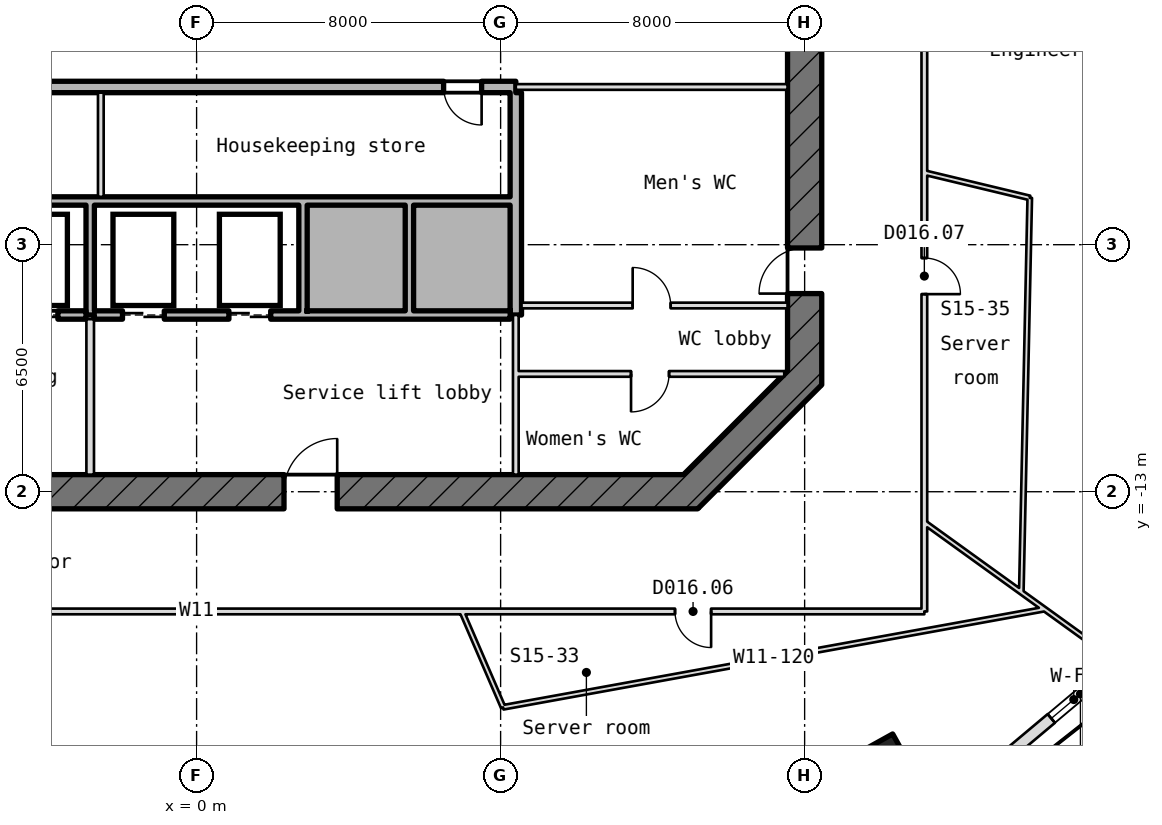
"""IFC4 building model, lengths in metres.
Left out: names, types, materials, properties, quantities, classifications, styles, units other than length and angle.
Written with IfcOpenShell. Run it as: python <this file> out.ifc"""

import sys

from ifc_helpers import new_model, si_unit, direction, frame, frame_2d, origin, origin_2d, place, context, subcontext, project, spatial, rectangle, hollow_rectangle, extrude, element, fill, save


model = new_model("IFC4")
c1 = context("Model", 3, precision=1e-05, world=origin(), true_north=direction((0.0, 1.0)))
c2 = subcontext(c1, "Body", "Model", "MODEL_VIEW")
j1 = project(units=[si_unit("LENGTHUNIT", "METRE"), si_unit("PLANEANGLEUNIT", "RADIAN")], contexts=[c1])
p1 = place(None, origin())
s1 = spatial("IfcSite", under=j1, at=p1, CompositionType="ELEMENT")
p2 = place(p1, origin())
s2 = spatial("IfcBuilding", under=s1, at=p2, CompositionType="ELEMENT")
p3 = place(p2, frame((0.0, 0.0, 223.3)))
s3 = spatial("IfcBuildingStorey", under=s2, at=p3, CompositionType="ELEMENT", Elevation=223.3)
p4 = place(p3, frame((17.971, -20.709, -0.18), z_axis=(0.0, 0.0, 1.0), x_axis=(-0.87430051837, -0.485385005514, 0.0)))
e1 = element("IfcColumn", 1, at=p4, inside=s3, PredefinedType="COLUMN", context=c2, shape_type="SweptSolid", body=[
    extrude(hollow_rectangle(XDim=1.9, YDim=2.0, WallThickness=0.07, at=origin_2d()), origin(), (0.0, 0.0, 1.0), 4.15),
])
p5 = place(p3, frame((18.849, -22.023, 0.0), z_axis=(0.0, 0.0, 1.0), x_axis=(0.765870158107, 0.642995257308, 0.0)))
e2 = element("IfcWall", 2, at=p5, inside=s3, PredefinedType="SOLIDWALL", context=c2, shape_type="SweptSolid", body=[
    extrude(rectangle(XDim=11.055, YDim=0.3, at=frame_2d((5.528, 0.0))), origin(), (0.0, 0.0, 1.0), 3.97),
])
p6 = place(p5, frame((7.355, 0.0, 0.0)))
e3 = element("IfcOpeningElement", 3, at=p6, cuts=e2, PredefinedType="OPENING", context=c2, shape_type="SweptSolid", body=[
    extrude(rectangle(XDim=1.8, YDim=2.4, at=frame_2d((0.9, 1.2))), frame((0.0, 0.16, 0.0), z_axis=(0.0, -1.0, 0.0), x_axis=(1.0, 0.0, 0.0)), (0.0, 0.0, 1.0), 0.32),
])
p7 = place(p5, frame((4.755, 0.0, 0.9)))
e4 = element("IfcOpeningElement", 4, at=p7, cuts=e2, PredefinedType="OPENING", context=c2, shape_type="SweptSolid", body=[
    extrude(rectangle(XDim=2.0, YDim=1.5, at=frame_2d((1.0, 0.75))), frame((0.0, 0.16, 0.0), z_axis=(0.0, -1.0, 0.0), x_axis=(1.0, 0.0, 0.0)), (0.0, 0.0, 1.0), 0.32),
])
p8 = place(p3, frame((12.868, -13.132, -0.18), z_axis=(0.0, 0.0, 1.0), x_axis=(0.707106781187, 0.707106781187, 0.0)))
e5 = element("IfcWall", 5, at=p8, inside=s3, PredefinedType="SHEAR", context=c2, shape_type="SweptSolid", body=[
    extrude(rectangle(XDim=4.615, YDim=0.9, at=frame_2d((2.308, 0.0))), origin(), (0.0, 0.0, 1.0), 4.15),
])
p9 = place(p3, frame((16.0, -10.186, -0.18), z_axis=(0.0, 0.0, 1.0), x_axis=(0.0, 1.0, 0.0)))
e6 = element("IfcWall", 6, at=p9, inside=s3, PredefinedType="SHEAR", context=c2, shape_type="SweptSolid", body=[
    extrude(rectangle(XDim=20.373, YDim=0.9, at=frame_2d((10.186, 0.0))), origin(), (0.0, 0.0, 1.0), 4.15),
])
p10 = place(p9, frame((8.986, 0.0, 0.18)))
e7 = element("IfcOpeningElement", 7, at=p10, cuts=e6, PredefinedType="OPENING", context=c2, shape_type="SweptSolid", body=[
    extrude(rectangle(XDim=2.4, YDim=2.1, at=frame_2d((1.2, 1.05))), frame((0.0, 0.46, 0.0), z_axis=(0.0, -1.0, 0.0), x_axis=(1.0, 0.0, 0.0)), (0.0, 0.0, 1.0), 0.92),
])
p11 = place(p9, frame((13.586, 0.0, 0.18)))
e8 = element("IfcOpeningElement", 8, at=p11, cuts=e6, PredefinedType="OPENING", context=c2, shape_type="SweptSolid", body=[
    extrude(rectangle(XDim=1.2, YDim=2.1, at=frame_2d((0.6, 1.05))), frame((0.0, 0.46, 0.0), z_axis=(0.0, -1.0, 0.0), x_axis=(1.0, 0.0, 0.0)), (0.0, 0.0, 1.0), 0.92),
])
p12 = place(p9, frame((2.4, 0.0, 0.18)))
e9 = element("IfcOpeningElement", 9, at=p12, cuts=e6, PredefinedType="OPENING", context=c2, shape_type="SweptSolid", body=[
    extrude(rectangle(XDim=1.2, YDim=2.1, at=frame_2d((0.6, 1.05))), frame((0.0, 0.46, 0.0), z_axis=(0.0, -1.0, 0.0), x_axis=(1.0, 0.0, 0.0)), (0.0, 0.0, 1.0), 0.92),
])
p13 = place(p3, frame((-13.186, -13.0, -0.18), z_axis=(0.0, 0.0, 1.0), x_axis=(1.0, 0.0, 0.0)))
e10 = element("IfcWall", 10, at=p13, inside=s3, PredefinedType="SHEAR", context=c2, shape_type="SweptSolid", body=[
    extrude(rectangle(XDim=26.373, YDim=0.9, at=frame_2d((13.186, 0.0))), origin(), (0.0, 0.0, 1.0), 4.15),
])
p14 = place(p13, frame((2.886, 0.0, 0.18)))
e11 = element("IfcOpeningElement", 11, at=p14, cuts=e10, PredefinedType="OPENING", context=c2, shape_type="SweptSolid", body=[
    extrude(rectangle(XDim=1.2, YDim=2.1, at=frame_2d((0.6, 1.05))), frame((0.0, 0.46, 0.0), z_axis=(0.0, -1.0, 0.0), x_axis=(1.0, 0.0, 0.0)), (0.0, 0.0, 1.0), 0.92),
])
p15 = place(p13, frame((6.886, 0.0, 0.18)))
e12 = element("IfcOpeningElement", 12, at=p15, cuts=e10, PredefinedType="OPENING", context=c2, shape_type="SweptSolid", body=[
    extrude(rectangle(XDim=1.4, YDim=2.1, at=frame_2d((0.7, 1.05))), frame((0.0, 0.46, 0.0), z_axis=(0.0, -1.0, 0.0), x_axis=(1.0, 0.0, 0.0)), (0.0, 0.0, 1.0), 0.92),
])
p16 = place(p13, frame((15.486, 0.0, 0.18)))
e13 = element("IfcOpeningElement", 13, at=p16, cuts=e10, PredefinedType="OPENING", context=c2, shape_type="SweptSolid", body=[
    extrude(rectangle(XDim=1.4, YDim=2.1, at=frame_2d((0.7, 1.05))), frame((0.0, 0.46, 0.0), z_axis=(0.0, -1.0, 0.0), x_axis=(1.0, 0.0, 0.0)), (0.0, 0.0, 1.0), 0.92),
])
p17 = place(p3, frame((8.475, -9.9, 0.0), z_axis=(0.0, 0.0, 1.0), x_axis=(1.0, 0.0, 0.0)))
e14 = element("IfcWall", 14, at=p17, inside=s3, PredefinedType="PARTITIONING", context=c2, shape_type="SweptSolid", body=[
    extrude(rectangle(XDim=6.989, YDim=0.15, at=frame_2d((3.494, 0.0))), origin(), (0.0, 0.0, 1.0), 3.97),
])
p18 = place(p17, frame((2.957, 0.0, 0.0)))
e15 = element("IfcOpeningElement", 15, at=p18, cuts=e14, PredefinedType="OPENING", context=c2, shape_type="SweptSolid", body=[
    extrude(rectangle(XDim=1.0, YDim=2.1, at=frame_2d((0.5, 1.05))), frame((0.0, 0.085, 0.0), z_axis=(0.0, -1.0, 0.0), x_axis=(1.0, 0.0, 0.0)), (0.0, 0.0, 1.0), 0.17),
])
p19 = place(p3, frame((-8.25, -8.35, 0.0), z_axis=(0.0, 0.0, 1.0), x_axis=(1.0, 0.0, 0.0)))
e16 = element("IfcWall", 16, at=p19, inside=s3, PredefinedType="STANDARD", context=c2, shape_type="SweptSolid", body=[
    extrude(rectangle(XDim=5.34, YDim=0.22, at=frame_2d((2.67, 0.0))), origin(), (0.0, 0.0, 1.0), 3.97),
])
p20 = place(p19, frame((0.7, 0.0, 0.0)))
e17 = element("IfcOpeningElement", 17, at=p20, cuts=e16, PredefinedType="OPENING", context=c2, shape_type="SweptSolid", body=[
    extrude(rectangle(XDim=1.1, YDim=2.1, at=frame_2d((0.55, 1.05))), frame((0.0, 0.12, 0.0), z_axis=(0.0, -1.0, 0.0), x_axis=(1.0, 0.0, 0.0)), (0.0, 0.0, 1.0), 0.24),
])
p21 = place(p19, frame((3.5, 0.0, 0.0)))
e18 = element("IfcOpeningElement", 18, at=p21, cuts=e16, PredefinedType="OPENING", context=c2, shape_type="SweptSolid", body=[
    extrude(rectangle(XDim=1.1, YDim=2.1, at=frame_2d((0.55, 1.05))), frame((0.0, 0.12, 0.0), z_axis=(0.0, -1.0, 0.0), x_axis=(1.0, 0.0, 0.0)), (0.0, 0.0, 1.0), 0.24),
])
p22 = place(p3, frame((-2.69, -8.35, 0.0), z_axis=(0.0, 0.0, 1.0), x_axis=(1.0, 0.0, 0.0)))
e19 = element("IfcWall", 19, at=p22, inside=s3, PredefinedType="STANDARD", context=c2, shape_type="SweptSolid", body=[
    extrude(rectangle(XDim=10.94, YDim=0.22, at=frame_2d((5.47, 0.0))), origin(), (0.0, 0.0, 1.0), 3.97),
])
p23 = place(p22, frame((0.74, 0.0, 0.0)))
e20 = element("IfcOpeningElement", 20, at=p23, cuts=e19, PredefinedType="OPENING", context=c2, shape_type="SweptSolid", body=[
    extrude(rectangle(XDim=1.1, YDim=2.1, at=frame_2d((0.55, 1.05))), frame((0.0, 0.12, 0.0), z_axis=(0.0, -1.0, 0.0), x_axis=(1.0, 0.0, 0.0)), (0.0, 0.0, 1.0), 0.24),
])
p24 = place(p22, frame((3.54, 0.0, 0.0)))
e21 = element("IfcOpeningElement", 21, at=p24, cuts=e19, PredefinedType="OPENING", context=c2, shape_type="SweptSolid", body=[
    extrude(rectangle(XDim=1.1, YDim=2.1, at=frame_2d((0.55, 1.05))), frame((0.0, 0.12, 0.0), z_axis=(0.0, -1.0, 0.0), x_axis=(1.0, 0.0, 0.0)), (0.0, 0.0, 1.0), 0.24),
])
p25 = place(p3, frame((8.55, -8.1, 0.0), z_axis=(0.0, 0.0, 1.0), x_axis=(1.0, 0.0, 0.0)))
e22 = element("IfcWall", 22, at=p25, inside=s3, PredefinedType="PARTITIONING", context=c2, shape_type="SweptSolid", body=[
    extrude(rectangle(XDim=7.0, YDim=0.15, at=frame_2d((3.5, 0.0))), origin(), (0.0, 0.0, 1.0), 3.97),
])
p26 = place(p25, frame((2.925, 0.0, 0.0)))
e23 = element("IfcOpeningElement", 23, at=p26, cuts=e22, PredefinedType="OPENING", context=c2, shape_type="SweptSolid", body=[
    extrude(rectangle(XDim=1.0, YDim=2.1, at=frame_2d((0.5, 1.05))), frame((0.0, 0.085, 0.0), z_axis=(0.0, -1.0, 0.0), x_axis=(1.0, 0.0, 0.0)), (0.0, 0.0, 1.0), 0.17),
])
p27 = place(p3, frame((-8.25, -5.35, 0.0), z_axis=(0.0, 0.0, 1.0), x_axis=(1.0, 0.0, 0.0)))
e24 = element("IfcWall", 24, at=p27, inside=s3, PredefinedType="STANDARD", context=c2, shape_type="SweptSolid", body=[
    extrude(rectangle(XDim=16.5, YDim=0.22, at=frame_2d((8.25, 0.0))), origin(), (0.0, 0.0, 1.0), 3.97),
])
p28 = place(p3, frame((-8.4, -2.35, -0.18), z_axis=(0.0, 0.0, 1.0), x_axis=(1.0, 0.0, 0.0)))
e25 = element("IfcWall", 25, at=p28, inside=s3, PredefinedType="SHEAR", context=c2, shape_type="SweptSolid", body=[
    extrude(rectangle(XDim=16.8, YDim=0.3, at=frame_2d((8.4, 0.0))), origin(), (0.0, 0.0, 1.0), 4.15),
])
p29 = place(p28, frame((0.9, 0.0, 0.18)))
e26 = element("IfcOpeningElement", 26, at=p29, cuts=e25, PredefinedType="OPENING", context=c2, shape_type="SweptSolid", body=[
    extrude(rectangle(XDim=1.0, YDim=2.1, at=frame_2d((0.5, 1.05))), frame((0.0, 0.16, 0.0), z_axis=(0.0, -1.0, 0.0), x_axis=(1.0, 0.0, 0.0)), (0.0, 0.0, 1.0), 0.32),
])
p30 = place(p28, frame((14.9, 0.0, 0.18)))
e27 = element("IfcOpeningElement", 27, at=p30, cuts=e25, PredefinedType="OPENING", context=c2, shape_type="SweptSolid", body=[
    extrude(rectangle(XDim=1.0, YDim=2.1, at=frame_2d((0.5, 1.05))), frame((0.0, 0.16, 0.0), z_axis=(0.0, -1.0, 0.0), x_axis=(1.0, 0.0, 0.0)), (0.0, 0.0, 1.0), 0.32),
])
p31 = place(p3, frame((8.4, -2.35, 0.0), z_axis=(0.0, 0.0, 1.0), x_axis=(1.0, 0.0, 0.0)))
e28 = element("IfcWall", 28, at=p31, inside=s3, PredefinedType="PARTITIONING", context=c2, shape_type="SweptSolid", body=[
    extrude(rectangle(XDim=7.15, YDim=0.15, at=frame_2d((3.575, 0.0))), origin(), (0.0, 0.0, 1.0), 3.97),
])
p32 = place(p3, frame((-2.8, -12.55, 0.0), z_axis=(0.0, 0.0, 1.0), x_axis=(0.0, 1.0, 0.0)))
e29 = element("IfcWall", 29, at=p32, inside=s3, PredefinedType="PARTITIONING", context=c2, shape_type="SweptSolid", body=[
    extrude(rectangle(XDim=4.09, YDim=0.2, at=frame_2d((2.045, 0.0))), origin(), (0.0, 0.0, 1.0), 3.97),
])
p33 = place(p3, frame((-2.8, -8.35, 0.0), z_axis=(0.0, 0.0, 1.0), x_axis=(0.0, 1.0, 0.0)))
e30 = element("IfcWall", 30, at=p33, inside=s3, PredefinedType="STANDARD", context=c2, shape_type="SweptSolid", body=[
    extrude(rectangle(XDim=2.89, YDim=0.22, at=frame_2d((1.445, 0.0))), origin(), (0.0, 0.0, 1.0), 3.97),
])
p34 = place(p3, frame((-2.52, -5.24, 0.0), z_axis=(0.0, 0.0, 1.0), x_axis=(0.0, 1.0, 0.0)))
e31 = element("IfcWall", 31, at=p34, inside=s3, PredefinedType="PARTITIONING", context=c2, shape_type="SweptSolid", body=[
    extrude(rectangle(XDim=2.74, YDim=0.15, at=frame_2d((1.37, 0.0))), origin(), (0.0, 0.0, 1.0), 3.97),
])
for number, where, z_axis, x_axis in (
    (32, (2.8, -8.24, 0.0), (0.0, 0.0, 1.0), (0.0, 1.0, 0.0)),
    (33, (5.6, -8.24, 0.0), (0.0, 0.0, 1.0), (0.0, 1.0, 0.0)),
):
    element("IfcWall", number, at=place(p3, frame(where, z_axis=z_axis, x_axis=x_axis)), inside=s3, PredefinedType="STANDARD", context=c2, shape_type="SweptSolid", body=[
        extrude(rectangle(XDim=2.78, YDim=0.22, at=frame_2d((1.39, 0.0))), origin(), (0.0, 0.0, 1.0), 3.97),
    ])
p35 = place(p3, frame((8.4, -12.55, 0.0), z_axis=(0.0, 0.0, 1.0), x_axis=(0.0, 1.0, 0.0)))
e34 = element("IfcWall", 34, at=p35, inside=s3, PredefinedType="PARTITIONING", context=c2, shape_type="SweptSolid", body=[
    extrude(rectangle(XDim=4.2, YDim=0.15, at=frame_2d((2.1, 0.0))), origin(), (0.0, 0.0, 1.0), 3.97),
])
p36 = place(p3, frame((8.4, -8.35, -0.18), z_axis=(0.0, 0.0, 1.0), x_axis=(0.0, 1.0, 0.0)))
e35 = element("IfcWall", 35, at=p36, inside=s3, PredefinedType="SHEAR", context=c2, shape_type="SweptSolid", body=[
    extrude(rectangle(XDim=5.85, YDim=0.3, at=frame_2d((2.925, 0.0))), origin(), (0.0, 0.0, 1.0), 4.15),
])
p37 = place(p3, frame((8.066, -18.673, 0.0), z_axis=(0.0, 0.0, 1.0), x_axis=(0.983945089575, 0.178471456263, 0.0)))
e36 = element("IfcWall", 36, at=p37, inside=s3, PredefinedType="PARTITIONING", context=c2, shape_type="SweptSolid", body=[
    extrude(rectangle(XDim=14.48, YDim=0.12, at=frame_2d((7.24, 0.0))), origin(), (0.0, 0.0, 1.0), 3.97),
])
p38 = place(p3, frame((8.066, -18.673, 0.0), z_axis=(0.0, 0.0, 1.0), x_axis=(-0.39651259826, 0.918029280264, 0.0)))
e37 = element("IfcWall", 37, at=p38, inside=s3, PredefinedType="PARTITIONING", context=c2, shape_type="SweptSolid", body=[
    extrude(rectangle(XDim=2.748, YDim=0.12, at=frame_2d((1.374, 0.0))), origin(), (0.0, 0.0, 1.0), 3.97),
])
p39 = place(p3, frame((19.15, -16.15, 0.0), z_axis=(0.0, 0.0, 1.0), x_axis=(-1.0, 0.0, 0.0)))
e38 = element("IfcWall", 38, at=p39, inside=s3, PredefinedType="PARTITIONING", context=c2, shape_type="SweptSolid", body=[
    extrude(rectangle(XDim=38.3, YDim=0.15, at=frame_2d((19.15, 0.0))), origin(), (0.0, 0.0, 1.0), 3.97),
])
p40 = place(p39, frame((5.611, 0.0, 0.0)))
e39 = element("IfcOpeningElement", 39, at=p40, cuts=e38, PredefinedType="OPENING", context=c2, shape_type="SweptSolid", body=[
    extrude(rectangle(XDim=0.95, YDim=2.1, at=frame_2d((0.475, 1.05))), frame((0.0, 0.085, 0.0), z_axis=(0.0, -1.0, 0.0), x_axis=(1.0, 0.0, 0.0)), (0.0, 0.0, 1.0), 0.17),
])
p41 = place(p39, frame((30.414, 0.0, 0.0)))
e40 = element("IfcOpeningElement", 40, at=p41, cuts=e38, PredefinedType="OPENING", context=c2, shape_type="SweptSolid", body=[
    extrude(rectangle(XDim=1.8, YDim=2.1, at=frame_2d((0.9, 1.05))), frame((0.0, 0.085, 0.0), z_axis=(0.0, -1.0, 0.0), x_axis=(1.0, 0.0, 0.0)), (0.0, 0.0, 1.0), 0.17),
])
p42 = place(p3, frame((19.15, -13.807, 0.0), z_axis=(0.0, 0.0, 1.0), x_axis=(0.811160965087, -0.584822955021, 0.0)))
e41 = element("IfcWall", 41, at=p42, inside=s3, PredefinedType="PARTITIONING", context=c2, shape_type="SweptSolid", body=[
    extrude(rectangle(XDim=6.291, YDim=0.12, at=frame_2d((3.146, 0.0))), origin(), (0.0, 0.0, 1.0), 3.97),
])
p43 = place(p3, frame((19.15, 14.9, 0.0), z_axis=(0.0, 0.0, 1.0), x_axis=(0.0, -1.0, 0.0)))
e42 = element("IfcWall", 42, at=p43, inside=s3, PredefinedType="PARTITIONING", context=c2, shape_type="SweptSolid", body=[
    extrude(rectangle(XDim=31.05, YDim=0.15, at=frame_2d((15.525, 0.0))), origin(), (0.0, 0.0, 1.0), 3.97),
])
p44 = place(p43, frame((21.751, 0.0, 0.0)))
e43 = element("IfcOpeningElement", 43, at=p44, cuts=e42, PredefinedType="OPENING", context=c2, shape_type="SweptSolid", body=[
    extrude(rectangle(XDim=0.95, YDim=2.1, at=frame_2d((0.475, 1.05))), frame((0.0, 0.085, 0.0), z_axis=(0.0, -1.0, 0.0), x_axis=(1.0, 0.0, 0.0)), (0.0, 0.0, 1.0), 0.17),
])
p45 = place(p43, frame((10.576, 0.0, 0.0)))
e44 = element("IfcOpeningElement", 44, at=p45, cuts=e42, PredefinedType="OPENING", context=c2, shape_type="SweptSolid", body=[
    extrude(rectangle(XDim=1.8, YDim=2.1, at=frame_2d((0.9, 1.05))), frame((0.0, 0.085, 0.0), z_axis=(0.0, -1.0, 0.0), x_axis=(1.0, 0.0, 0.0)), (0.0, 0.0, 1.0), 0.17),
])
p46 = place(p3, frame((21.701, -15.647, 0.0), z_axis=(0.0, 0.0, 1.0), x_axis=(0.021402327954, 0.999770943946, 0.0)))
e45 = element("IfcWall", 45, at=p46, inside=s3, PredefinedType="PARTITIONING", context=c2, shape_type="SweptSolid", body=[
    extrude(rectangle(XDim=10.381, YDim=0.12, at=frame_2d((5.19, 0.0))), origin(), (0.0, 0.0, 1.0), 3.97),
])
p47 = place(p3, frame((21.924, -5.269, 0.0), z_axis=(0.0, 0.0, 1.0), x_axis=(-0.972322007638, 0.233644844719, 0.0)))
e46 = element("IfcWall", 46, at=p47, inside=s3, PredefinedType="PARTITIONING", context=c2, shape_type="SweptSolid", body=[
    extrude(rectangle(XDim=2.853, YDim=0.12, at=frame_2d((1.426, 0.0))), origin(), (0.0, 0.0, 1.0), 3.97),
])
p48 = place(p7, origin())
e47 = element("IfcWindow", 47, at=p48, inside=s3, PartitioningType="SINGLE_PANEL", PredefinedType="WINDOW", context=c2, shape_type="SweptSolid", body=[
    extrude(rectangle(XDim=2.0, YDim=1.5, at=frame_2d((1.0, 0.75))), frame((0.0, 0.03, 0.0), z_axis=(0.0, -1.0, 0.0), x_axis=(1.0, 0.0, 0.0)), (0.0, 0.0, 1.0), 0.06),
])
fill(e4, e47)
p49 = place(p21, origin())
e48 = element("IfcDoor", 48, at=p49, inside=s3, OperationType="DOUBLE_DOOR_SLIDING", PredefinedType="DOOR", context=c2, shape_type="SweptSolid", body=[
    extrude(rectangle(XDim=1.1, YDim=2.1, at=frame_2d((0.55, 1.05))), frame((0.0, 0.025, 0.0), z_axis=(0.0, -1.0, 0.0), x_axis=(1.0, 0.0, 0.0)), (0.0, 0.0, 1.0), 0.05),
])
fill(e18, e48)
p50 = place(p23, origin())
e49 = element("IfcDoor", 49, at=p50, inside=s3, OperationType="DOUBLE_DOOR_SLIDING", PredefinedType="DOOR", context=c2, shape_type="SweptSolid", body=[
    extrude(rectangle(XDim=1.1, YDim=2.1, at=frame_2d((0.55, 1.05))), frame((0.0, 0.025, 0.0), z_axis=(0.0, -1.0, 0.0), x_axis=(1.0, 0.0, 0.0)), (0.0, 0.0, 1.0), 0.05),
])
fill(e20, e49)
p51 = place(p24, origin())
e50 = element("IfcDoor", 50, at=p51, inside=s3, OperationType="DOUBLE_DOOR_SLIDING", PredefinedType="DOOR", context=c2, shape_type="SweptSolid", body=[
    extrude(rectangle(XDim=1.1, YDim=2.1, at=frame_2d((0.55, 1.05))), frame((0.0, 0.025, 0.0), z_axis=(0.0, -1.0, 0.0), x_axis=(1.0, 0.0, 0.0)), (0.0, 0.0, 1.0), 0.05),
])
fill(e21, e50)
p52 = place(p16, origin())
e51 = element("IfcDoor", 51, at=p52, inside=s3, OperationType="SINGLE_SWING_RIGHT", PredefinedType="DOOR", context=c2, shape_type="SweptSolid", body=[
    extrude(rectangle(XDim=1.4, YDim=2.1, at=frame_2d((0.7, 1.05))), frame((0.0, 0.025, 0.0), z_axis=(0.0, -1.0, 0.0), x_axis=(1.0, 0.0, 0.0)), (0.0, 0.0, 1.0), 0.05),
])
fill(e13, e51)
p53 = place(p30, frame((1.0, 0.0, 0.0), z_axis=(0.0, 0.0, 1.0), x_axis=(-1.0, 0.0, 0.0)))
e52 = element("IfcDoor", 52, at=p53, inside=s3, OperationType="SINGLE_SWING_LEFT", PredefinedType="DOOR", context=c2, shape_type="SweptSolid", body=[
    extrude(rectangle(XDim=1.0, YDim=2.1, at=frame_2d((0.5, 1.05))), frame((0.0, 0.025, 0.0), z_axis=(0.0, -1.0, 0.0), x_axis=(1.0, 0.0, 0.0)), (0.0, 0.0, 1.0), 0.05),
])
fill(e27, e52)
p54 = place(p26, origin())
e53 = element("IfcDoor", 53, at=p54, inside=s3, OperationType="SINGLE_SWING_RIGHT", PredefinedType="DOOR", context=c2, shape_type="SweptSolid", body=[
    extrude(rectangle(XDim=1.0, YDim=2.1, at=frame_2d((0.5, 1.05))), frame((0.0, 0.025, 0.0), z_axis=(0.0, -1.0, 0.0), x_axis=(1.0, 0.0, 0.0)), (0.0, 0.0, 1.0), 0.05),
])
fill(e23, e53)
p55 = place(p12, origin())
e54 = element("IfcDoor", 54, at=p55, inside=s3, OperationType="SINGLE_SWING_RIGHT", PredefinedType="DOOR", context=c2, shape_type="SweptSolid", body=[
    extrude(rectangle(XDim=1.2, YDim=2.1, at=frame_2d((0.6, 1.05))), frame((0.0, 0.025, 0.0), z_axis=(0.0, -1.0, 0.0), x_axis=(1.0, 0.0, 0.0)), (0.0, 0.0, 1.0), 0.05),
])
fill(e9, e54)
p56 = place(p18, frame((1.0, 0.0, 0.0), z_axis=(0.0, 0.0, 1.0), x_axis=(-1.0, 0.0, 0.0)))
e55 = element("IfcDoor", 55, at=p56, inside=s3, OperationType="SINGLE_SWING_LEFT", PredefinedType="DOOR", context=c2, shape_type="SweptSolid", body=[
    extrude(rectangle(XDim=1.0, YDim=2.1, at=frame_2d((0.5, 1.05))), frame((0.0, 0.025, 0.0), z_axis=(0.0, -1.0, 0.0), x_axis=(1.0, 0.0, 0.0)), (0.0, 0.0, 1.0), 0.05),
])
fill(e15, e55)
p57 = place(p40, origin())
e56 = element("IfcDoor", 56, at=p57, inside=s3, OperationType="SINGLE_SWING_RIGHT", PredefinedType="DOOR", context=c2, shape_type="SweptSolid", body=[
    extrude(rectangle(XDim=0.95, YDim=2.1, at=frame_2d((0.475, 1.05))), frame((0.0, 0.025, 0.0), z_axis=(0.0, -1.0, 0.0), x_axis=(1.0, 0.0, 0.0)), (0.0, 0.0, 1.0), 0.05),
])
fill(e39, e56)
p58 = place(p44, origin())
e57 = element("IfcDoor", 57, at=p58, inside=s3, OperationType="SINGLE_SWING_RIGHT", PredefinedType="DOOR", context=c2, shape_type="SweptSolid", body=[
    extrude(rectangle(XDim=0.95, YDim=2.1, at=frame_2d((0.475, 1.05))), frame((0.0, 0.025, 0.0), z_axis=(0.0, -1.0, 0.0), x_axis=(1.0, 0.0, 0.0)), (0.0, 0.0, 1.0), 0.05),
])
fill(e43, e57)
save(model, sys.argv[1])
